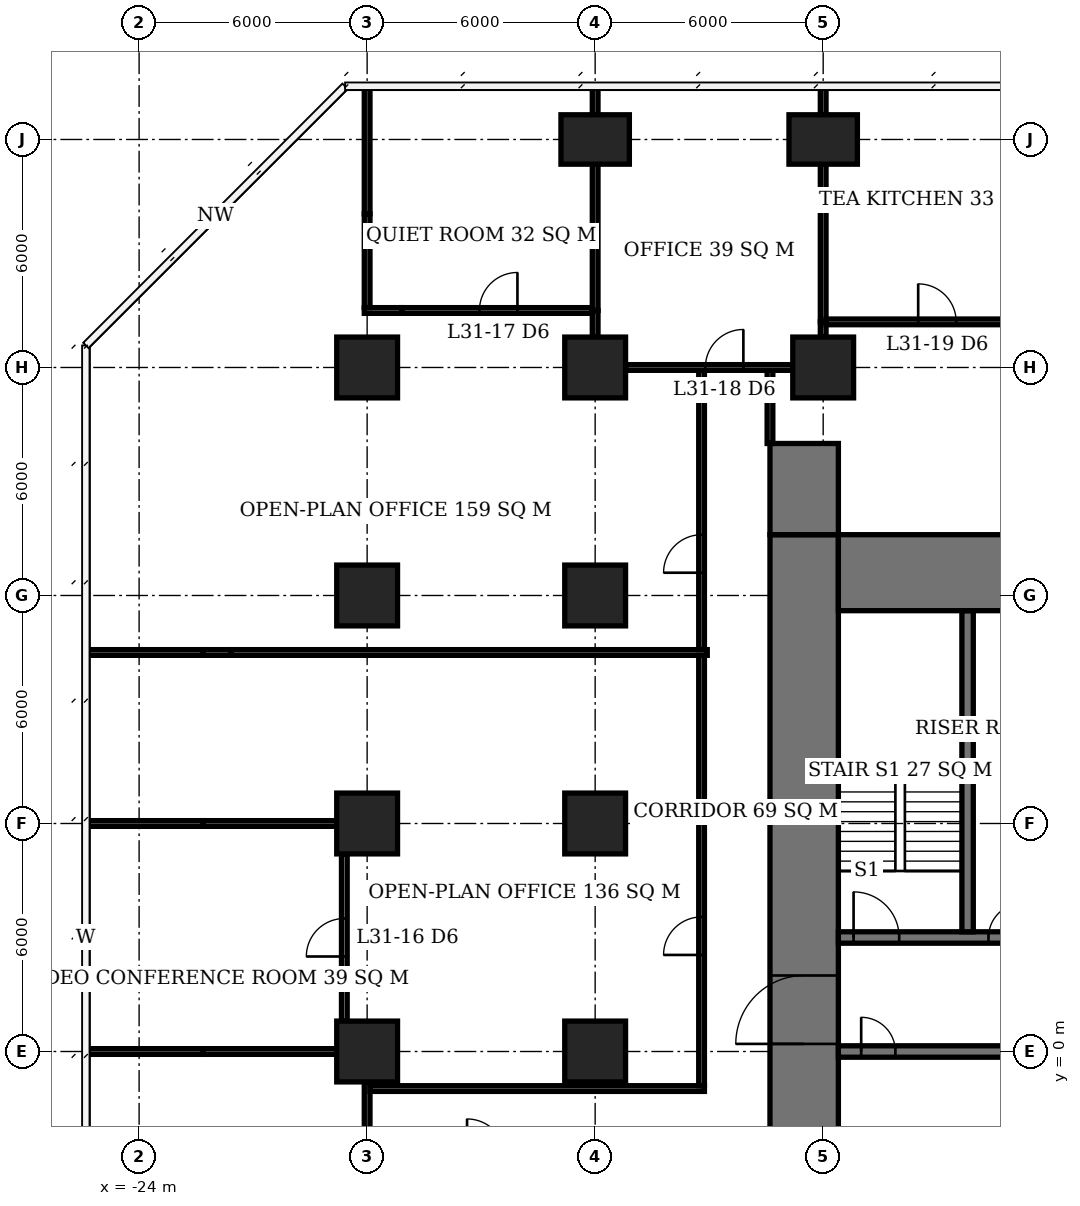
"""IFC4 building model, lengths in metres.
Left out: names, types, materials, properties, quantities, classifications, styles, units other than length and angle.
Written with IfcOpenShell. Run it as: python <this file> out.ifc"""

import sys

from ifc_helpers import new_model, si_unit, direction, frame, frame_2d, origin, origin_2d, place, context, subcontext, project, spatial, rectangle, extrude, element, fill, save


model = new_model("IFC4")
c1 = context("Model", 3, precision=1e-05, world=origin(), true_north=direction((0.0, 1.0)))
c2 = subcontext(c1, "Body", "Model", "MODEL_VIEW")
j1 = project(units=[si_unit("LENGTHUNIT", "METRE"), si_unit("PLANEANGLEUNIT", "RADIAN")], contexts=[c1])
p1 = place(None, origin())
s1 = spatial("IfcSite", under=j1, at=p1, CompositionType="ELEMENT")
p2 = place(p1, origin())
s2 = spatial("IfcBuilding", under=s1, at=p2, CompositionType="ELEMENT")
p3 = place(p2, frame((0.0, 0.0, 128.9)))
s3 = spatial("IfcBuildingStorey", under=s2, at=p3, CompositionType="ELEMENT", Elevation=128.9)
for number, where, z_axis, x_axis in (
    (1, (-18.0, 0.0, 0.0), (0.0, 0.0, 1.0), (1.0, 0.0, 0.0)),
    (2, (-18.0, 6.0, 0.0), (0.0, 0.0, 1.0), (1.0, 0.0, 0.0)),
    (3, (-18.0, 12.0, 0.0), (0.0, 0.0, 1.0), (1.0, 0.0, 0.0)),
    (4, (-18.0, 18.0, 0.0), (0.0, 0.0, 1.0), (1.0, 0.0, 0.0)),
    (5, (-12.0, 0.0, 0.0), (0.0, 0.0, 1.0), (1.0, 0.0, 0.0)),
    (6, (-12.0, 6.0, 0.0), (0.0, 0.0, 1.0), (1.0, 0.0, 0.0)),
    (7, (-12.0, 12.0, 0.0), (0.0, 0.0, 1.0), (1.0, 0.0, 0.0)),
    (8, (-12.0, 18.0, 0.0), (0.0, 0.0, 1.0), (1.0, 0.0, 0.0)),
):
    element("IfcColumn", number, at=place(p3, frame(where, z_axis=z_axis, x_axis=x_axis)), inside=s3, PredefinedType="COLUMN", context=c2, shape_type="SweptSolid", body=[
        extrude(rectangle(XDim=1.6, YDim=1.6, at=origin_2d()), origin(), (0.0, 0.0, 1.0), 3.9),
    ])
p4 = place(p3, frame((-12.0, 24.0, 0.0), z_axis=(0.0, 0.0, 1.0), x_axis=(1.0, 0.0, 0.0)))
e9 = element("IfcColumn", 9, at=p4, inside=s3, PredefinedType="COLUMN", context=c2, shape_type="SweptSolid", body=[
    extrude(rectangle(XDim=1.8, YDim=1.3, at=origin_2d()), origin(), (0.0, 0.0, 1.0), 3.9),
])
p5 = place(p3, frame((-6.0, 18.0, 0.0), z_axis=(0.0, 0.0, 1.0), x_axis=(1.0, 0.0, 0.0)))
e10 = element("IfcColumn", 10, at=p5, inside=s3, PredefinedType="COLUMN", context=c2, shape_type="SweptSolid", body=[
    extrude(rectangle(XDim=1.6, YDim=1.6, at=origin_2d()), origin(), (0.0, 0.0, 1.0), 3.9),
])
p6 = place(p3, frame((-6.0, 24.0, 0.0), z_axis=(0.0, 0.0, 1.0), x_axis=(1.0, 0.0, 0.0)))
e11 = element("IfcColumn", 11, at=p6, inside=s3, PredefinedType="COLUMN", context=c2, shape_type="SweptSolid", body=[
    extrude(rectangle(XDim=1.8, YDim=1.3, at=origin_2d()), origin(), (0.0, 0.0, 1.0), 3.9),
])
p7 = place(p3, frame((-5.6, 12.6, 0.0), z_axis=(0.0, 0.0, 1.0), x_axis=(1.0, 0.0, 0.0)))
e12 = element("IfcWall", 12, at=p7, inside=s3, PredefinedType="SHEAR", context=c2, shape_type="SweptSolid", body=[
    extrude(rectangle(XDim=23.2, YDim=2.0, at=frame_2d((11.6, 0.0))), origin(), (0.0, 0.0, 1.0), 3.9),
])
p8 = place(p3, frame((-6.5, -7.6, 0.0), z_axis=(0.0, 0.0, 1.0), x_axis=(0.0, 1.0, 0.0)))
e13 = element("IfcWall", 13, at=p8, inside=s3, PredefinedType="SHEAR", context=c2, shape_type="SweptSolid", body=[
    extrude(rectangle(XDim=21.2, YDim=1.8, at=frame_2d((10.6, 0.0))), origin(), (0.0, 0.0, 1.0), 3.9),
])
p9 = place(p8, frame((7.8, 0.0, 0.0)))
e14 = element("IfcOpeningElement", 14, at=p9, cuts=e13, PredefinedType="OPENING", context=c2, shape_type="SweptSolid", body=[
    extrude(rectangle(XDim=1.8, YDim=2.4, at=frame_2d((0.9, 1.2))), frame((0.0, 0.91, 0.0), z_axis=(0.0, -1.0, 0.0), x_axis=(1.0, 0.0, 0.0)), (0.0, 0.0, 1.0), 1.82),
])
p10 = place(p3, frame((-6.5, 13.6, 0.0), z_axis=(0.0, 0.0, 1.0), x_axis=(0.0, 1.0, 0.0)))
e15 = element("IfcWall", 15, at=p10, inside=s3, PredefinedType="SHEAR", context=c2, shape_type="SweptSolid", body=[
    extrude(rectangle(XDim=2.4, YDim=1.8, at=frame_2d((1.2, 0.0))), origin(), (0.0, 0.0, 1.0), 3.9),
])
p11 = place(p3, frame((-5.6, 0.0, 0.0), z_axis=(0.0, 0.0, 1.0), x_axis=(1.0, 0.0, 0.0)))
e16 = element("IfcWall", 16, at=p11, inside=s3, PredefinedType="SHEAR", context=c2, shape_type="SweptSolid", body=[
    extrude(rectangle(XDim=17.75, YDim=0.3, at=frame_2d((8.875, 0.0))), origin(), (0.0, 0.0, 1.0), 3.9),
])
p12 = place(p11, frame((0.6, 0.0, 0.0)))
e17 = element("IfcOpeningElement", 17, at=p12, cuts=e16, PredefinedType="OPENING", context=c2, shape_type="SweptSolid", body=[
    extrude(rectangle(XDim=0.9, YDim=2.1, at=frame_2d((0.45, 1.05))), frame((0.0, 0.16, 0.0), z_axis=(0.0, -1.0, 0.0), x_axis=(1.0, 0.0, 0.0)), (0.0, 0.0, 1.0), 0.32),
])
p13 = place(p11, frame((6.55, 0.0, 0.0)))
e18 = element("IfcOpeningElement", 18, at=p13, cuts=e16, PredefinedType="OPENING", context=c2, shape_type="SweptSolid", body=[
    extrude(rectangle(XDim=1.1, YDim=2.1, at=frame_2d((0.55, 1.05))), frame((0.0, 0.16, 0.0), z_axis=(0.0, -1.0, 0.0), x_axis=(1.0, 0.0, 0.0)), (0.0, 0.0, 1.0), 0.32),
])
p14 = place(p11, frame((9.55, 0.0, 0.0)))
e19 = element("IfcOpeningElement", 19, at=p14, cuts=e16, PredefinedType="OPENING", context=c2, shape_type="SweptSolid", body=[
    extrude(rectangle(XDim=1.1, YDim=2.1, at=frame_2d((0.55, 1.05))), frame((0.0, 0.16, 0.0), z_axis=(0.0, -1.0, 0.0), x_axis=(1.0, 0.0, 0.0)), (0.0, 0.0, 1.0), 0.32),
])
p15 = place(p3, frame((-5.6, 3.0, 0.0), z_axis=(0.0, 0.0, 1.0), x_axis=(1.0, 0.0, 0.0)))
e20 = element("IfcWall", 20, at=p15, inside=s3, PredefinedType="SHEAR", context=c2, shape_type="SweptSolid", body=[
    extrude(rectangle(XDim=5.45, YDim=0.3, at=frame_2d((2.725, 0.0))), origin(), (0.0, 0.0, 1.0), 3.9),
])
p16 = place(p15, frame((0.4, 0.0, 0.0)))
e21 = element("IfcOpeningElement", 21, at=p16, cuts=e20, PredefinedType="OPENING", context=c2, shape_type="SweptSolid", body=[
    extrude(rectangle(XDim=1.2, YDim=2.1, at=frame_2d((0.6, 1.05))), frame((0.0, 0.16, 0.0), z_axis=(0.0, -1.0, 0.0), x_axis=(1.0, 0.0, 0.0)), (0.0, 0.0, 1.0), 0.32),
])
p17 = place(p15, frame((3.95, 0.0, 0.0)))
e22 = element("IfcOpeningElement", 22, at=p17, cuts=e20, PredefinedType="OPENING", context=c2, shape_type="SweptSolid", body=[
    extrude(rectangle(XDim=0.9, YDim=2.1, at=frame_2d((0.45, 1.05))), frame((0.0, 0.16, 0.0), z_axis=(0.0, -1.0, 0.0), x_axis=(1.0, 0.0, 0.0)), (0.0, 0.0, 1.0), 0.32),
])
p18 = place(p3, frame((-2.2, 3.15, 0.0), z_axis=(0.0, 0.0, 1.0), x_axis=(0.0, 1.0, 0.0)))
e23 = element("IfcWall", 23, at=p18, inside=s3, PredefinedType="SHEAR", context=c2, shape_type="SweptSolid", body=[
    extrude(rectangle(XDim=8.45, YDim=0.3, at=frame_2d((4.225, 0.0))), origin(), (0.0, 0.0, 1.0), 3.9),
])
p19 = place(p3, frame((-25.35, 0.0, 0.0), z_axis=(0.0, 0.0, 1.0), x_axis=(1.0, 0.0, 0.0)))
e24 = element("IfcWall", 24, at=p19, inside=s3, PredefinedType="PARTITIONING", context=c2, shape_type="SweptSolid", body=[
    extrude(rectangle(XDim=3.04, YDim=0.15, at=frame_2d((1.52, 0.0))), origin(), (0.0, 0.0, 1.0), 3.65),
])
p20 = place(p3, frame((-22.31, 0.0, 0.0), z_axis=(0.0, 0.0, 1.0), x_axis=(1.0, 0.0, 0.0)))
e25 = element("IfcWall", 25, at=p20, inside=s3, PredefinedType="PARTITIONING", context=c2, shape_type="SweptSolid", body=[
    extrude(rectangle(XDim=3.51, YDim=0.15, at=frame_2d((1.755, 0.0))), origin(), (0.0, 0.0, 1.0), 2.65),
])
p21 = place(p3, frame((-25.35, 6.0, 0.0), z_axis=(0.0, 0.0, 1.0), x_axis=(1.0, 0.0, 0.0)))
e26 = element("IfcWall", 26, at=p21, inside=s3, PredefinedType="PARTITIONING", context=c2, shape_type="SweptSolid", body=[
    extrude(rectangle(XDim=3.04, YDim=0.15, at=frame_2d((1.52, 0.0))), origin(), (0.0, 0.0, 1.0), 3.65),
])
p22 = place(p3, frame((-22.31, 6.0, 0.0), z_axis=(0.0, 0.0, 1.0), x_axis=(1.0, 0.0, 0.0)))
e27 = element("IfcWall", 27, at=p22, inside=s3, PredefinedType="PARTITIONING", context=c2, shape_type="SweptSolid", body=[
    extrude(rectangle(XDim=3.51, YDim=0.15, at=frame_2d((1.755, 0.0))), origin(), (0.0, 0.0, 1.0), 2.65),
])
p23 = place(p3, frame((-11.2, 18.0, 0.0), z_axis=(0.0, 0.0, 1.0), x_axis=(1.0, 0.0, 0.0)))
e28 = element("IfcWall", 28, at=p23, inside=s3, PredefinedType="PARTITIONING", context=c2, shape_type="SweptSolid", body=[
    extrude(rectangle(XDim=4.4, YDim=0.15, at=frame_2d((2.2, 0.0))), origin(), (0.0, 0.0, 1.0), 3.65),
])
p24 = place(p23, frame((2.1, 0.0, 0.0)))
e29 = element("IfcOpeningElement", 29, at=p24, cuts=e28, PredefinedType="OPENING", context=c2, shape_type="SweptSolid", body=[
    extrude(rectangle(XDim=1.0, YDim=2.1, at=frame_2d((0.5, 1.05))), frame((0.0, 0.085, 0.0), z_axis=(0.0, -1.0, 0.0), x_axis=(1.0, 0.0, 0.0)), (0.0, 0.0, 1.0), 0.17),
])
p25 = place(p3, frame((-5.925, 19.2, 0.0), z_axis=(0.0, 0.0, 1.0), x_axis=(1.0, 0.0, 0.0)))
e30 = element("IfcWall", 30, at=p25, inside=s3, PredefinedType="PARTITIONING", context=c2, shape_type="SweptSolid", body=[
    extrude(rectangle(XDim=5.85, YDim=0.15, at=frame_2d((2.925, 0.0))), origin(), (0.0, 0.0, 1.0), 3.65),
])
p26 = place(p25, frame((2.425, 0.0, 0.0)))
e31 = element("IfcOpeningElement", 31, at=p26, cuts=e30, PredefinedType="OPENING", context=c2, shape_type="SweptSolid", body=[
    extrude(rectangle(XDim=1.0, YDim=2.1, at=frame_2d((0.5, 1.05))), frame((0.0, 0.085, 0.0), z_axis=(0.0, -1.0, 0.0), x_axis=(1.0, 0.0, 0.0)), (0.0, 0.0, 1.0), 0.17),
])
p27 = place(p3, frame((-18.075, 19.5, 0.0), z_axis=(0.0, 0.0, 1.0), x_axis=(1.0, 0.0, 0.0)))
e32 = element("IfcWall", 32, at=p27, inside=s3, PredefinedType="PARTITIONING", context=c2, shape_type="SweptSolid", body=[
    extrude(rectangle(XDim=0.985, YDim=0.15, at=frame_2d((0.492, 0.0))), origin(), (0.0, 0.0, 1.0), 2.65),
])
p28 = place(p3, frame((-17.09, 19.5, 0.0), z_axis=(0.0, 0.0, 1.0), x_axis=(1.0, 0.0, 0.0)))
e33 = element("IfcWall", 33, at=p28, inside=s3, PredefinedType="PARTITIONING", context=c2, shape_type="SweptSolid", body=[
    extrude(rectangle(XDim=5.015, YDim=0.15, at=frame_2d((2.508, 0.0))), origin(), (0.0, 0.0, 1.0), 3.65),
])
p29 = place(p28, frame((2.045, 0.0, 0.0)))
e34 = element("IfcOpeningElement", 34, at=p29, cuts=e33, PredefinedType="OPENING", context=c2, shape_type="SweptSolid", body=[
    extrude(rectangle(XDim=1.0, YDim=2.1, at=frame_2d((0.5, 1.05))), frame((0.0, 0.085, 0.0), z_axis=(0.0, -1.0, 0.0), x_axis=(1.0, 0.0, 0.0)), (0.0, 0.0, 1.0), 0.17),
])
p30 = place(p3, frame((-18.6, 0.8, 0.0), z_axis=(0.0, 0.0, 1.0), x_axis=(0.0, 1.0, 0.0)))
e35 = element("IfcWall", 35, at=p30, inside=s3, PredefinedType="PARTITIONING", context=c2, shape_type="SweptSolid", body=[
    extrude(rectangle(XDim=4.4, YDim=0.15, at=frame_2d((2.2, 0.0))), origin(), (0.0, 0.0, 1.0), 3.65),
])
p31 = place(p30, frame((1.7, 0.0, 0.0)))
e36 = element("IfcOpeningElement", 36, at=p31, cuts=e35, PredefinedType="OPENING", context=c2, shape_type="SweptSolid", body=[
    extrude(rectangle(XDim=1.0, YDim=2.1, at=frame_2d((0.5, 1.05))), frame((0.0, 0.085, 0.0), z_axis=(0.0, -1.0, 0.0), x_axis=(1.0, 0.0, 0.0)), (0.0, 0.0, 1.0), 0.17),
])
p32 = place(p3, frame((-18.0, -5.2, 0.0), z_axis=(0.0, 0.0, 1.0), x_axis=(0.0, 1.0, 0.0)))
e37 = element("IfcWall", 37, at=p32, inside=s3, PredefinedType="PARTITIONING", context=c2, shape_type="SweptSolid", body=[
    extrude(rectangle(XDim=4.4, YDim=0.15, at=frame_2d((2.2, 0.0))), origin(), (0.0, 0.0, 1.0), 3.65),
])
p33 = place(p3, frame((-18.0, 19.575, 0.0), z_axis=(0.0, 0.0, 1.0), x_axis=(0.0, 1.0, 0.0)))
e38 = element("IfcWall", 38, at=p33, inside=s3, PredefinedType="PARTITIONING", context=c2, shape_type="SweptSolid", body=[
    extrude(rectangle(XDim=2.47, YDim=0.15, at=frame_2d((1.235, 0.0))), origin(), (0.0, 0.0, 1.0), 2.65),
])
p34 = place(p3, frame((-18.0, 22.045, 0.0), z_axis=(0.0, 0.0, 1.0), x_axis=(0.0, 1.0, 0.0)))
e39 = element("IfcWall", 39, at=p34, inside=s3, PredefinedType="PARTITIONING", context=c2, shape_type="SweptSolid", body=[
    extrude(rectangle(XDim=3.355, YDim=0.15, at=frame_2d((1.677, 0.0))), origin(), (0.0, 0.0, 1.0), 3.65),
])
p35 = place(p3, frame((-12.0, 18.8, 0.0), z_axis=(0.0, 0.0, 1.0), x_axis=(0.0, 1.0, 0.0)))
e40 = element("IfcWall", 40, at=p35, inside=s3, PredefinedType="PARTITIONING", context=c2, shape_type="SweptSolid", body=[
    extrude(rectangle(XDim=0.7, YDim=0.15, at=frame_2d((0.35, 0.0))), origin(), (0.0, 0.0, 1.0), 3.65),
])
p36 = place(p3, frame((-12.0, 19.5, 0.0), z_axis=(0.0, 0.0, 1.0), x_axis=(0.0, 1.0, 0.0)))
e41 = element("IfcWall", 41, at=p36, inside=s3, PredefinedType="PARTITIONING", context=c2, shape_type="SweptSolid", body=[
    extrude(rectangle(XDim=3.85, YDim=0.15, at=frame_2d((1.925, 0.0))), origin(), (0.0, 0.0, 1.0), 3.65),
])
p37 = place(p3, frame((-12.0, 24.65, 0.0), z_axis=(0.0, 0.0, 1.0), x_axis=(0.0, 1.0, 0.0)))
e42 = element("IfcWall", 42, at=p37, inside=s3, PredefinedType="PARTITIONING", context=c2, shape_type="SweptSolid", body=[
    extrude(rectangle(XDim=0.75, YDim=0.15, at=frame_2d((0.375, 0.0))), origin(), (0.0, 0.0, 1.0), 3.65),
])
p38 = place(p3, frame((-6.0, 18.8, 0.0), z_axis=(0.0, 0.0, 1.0), x_axis=(0.0, 1.0, 0.0)))
e43 = element("IfcWall", 43, at=p38, inside=s3, PredefinedType="PARTITIONING", context=c2, shape_type="SweptSolid", body=[
    extrude(rectangle(XDim=0.4, YDim=0.15, at=frame_2d((0.2, 0.0))), origin(), (0.0, 0.0, 1.0), 3.65),
])
p39 = place(p3, frame((-6.0, 19.2, 0.0), z_axis=(0.0, 0.0, 1.0), x_axis=(0.0, 1.0, 0.0)))
e44 = element("IfcWall", 44, at=p39, inside=s3, PredefinedType="PARTITIONING", context=c2, shape_type="SweptSolid", body=[
    extrude(rectangle(XDim=4.15, YDim=0.15, at=frame_2d((2.075, 0.0))), origin(), (0.0, 0.0, 1.0), 3.65),
])
p40 = place(p3, frame((-6.0, 24.65, 0.0), z_axis=(0.0, 0.0, 1.0), x_axis=(0.0, 1.0, 0.0)))
e45 = element("IfcWall", 45, at=p40, inside=s3, PredefinedType="PARTITIONING", context=c2, shape_type="SweptSolid", body=[
    extrude(rectangle(XDim=0.75, YDim=0.15, at=frame_2d((0.375, 0.0))), origin(), (0.0, 0.0, 1.0), 3.65),
])
p41 = place(p3, frame((-25.4, 10.5, 0.0), z_axis=(0.0, 0.0, 1.0), x_axis=(1.0, 0.0, 0.0)))
e46 = element("IfcWall", 46, at=p41, inside=s3, PredefinedType="PARTITIONING", context=c2, shape_type="SweptSolid", body=[
    extrude(rectangle(XDim=3.09, YDim=0.15, at=frame_2d((1.545, 0.0))), origin(), (0.0, 0.0, 1.0), 3.65),
])
p42 = place(p3, frame((-22.31, 10.5, 0.0), z_axis=(0.0, 0.0, 1.0), x_axis=(1.0, 0.0, 0.0)))
e47 = element("IfcWall", 47, at=p42, inside=s3, PredefinedType="PARTITIONING", context=c2, shape_type="SweptSolid", body=[
    extrude(rectangle(XDim=0.72, YDim=0.15, at=frame_2d((0.36, 0.0))), origin(), (0.0, 0.0, 1.0), 2.65),
])
p43 = place(p3, frame((-21.59, 10.5, 0.0), z_axis=(0.0, 0.0, 1.0), x_axis=(1.0, 0.0, 0.0)))
e48 = element("IfcWall", 48, at=p43, inside=s3, PredefinedType="PARTITIONING", context=c2, shape_type="SweptSolid", body=[
    extrude(rectangle(XDim=12.54, YDim=0.15, at=frame_2d((6.27, 0.0))), origin(), (0.0, 0.0, 1.0), 3.65),
])
p44 = place(p3, frame((-17.925, -0.975, 0.0), z_axis=(0.0, 0.0, 1.0), x_axis=(1.0, 0.0, 0.0)))
e49 = element("IfcWall", 49, at=p44, inside=s3, PredefinedType="PARTITIONING", context=c2, shape_type="SweptSolid", body=[
    extrude(rectangle(XDim=8.8, YDim=0.15, at=frame_2d((4.4, 0.0))), origin(), (0.0, 0.0, 1.0), 3.65),
])
p45 = place(p3, frame((-9.2, -0.9, 0.0), z_axis=(0.0, 0.0, 1.0), x_axis=(0.0, 1.0, 0.0)))
e50 = element("IfcWall", 50, at=p45, inside=s3, PredefinedType="PARTITIONING", context=c2, shape_type="SweptSolid", body=[
    extrude(rectangle(XDim=11.325, YDim=0.15, at=frame_2d((5.663, 0.0))), origin(), (0.0, 0.0, 1.0), 3.65),
])
p46 = place(p45, frame((3.441, 0.0, 0.0)))
e51 = element("IfcOpeningElement", 51, at=p46, cuts=e50, PredefinedType="OPENING", context=c2, shape_type="SweptSolid", body=[
    extrude(rectangle(XDim=1.0, YDim=2.1, at=frame_2d((0.5, 1.05))), frame((0.0, 0.085, 0.0), z_axis=(0.0, -1.0, 0.0), x_axis=(1.0, 0.0, 0.0)), (0.0, 0.0, 1.0), 0.17),
])
p47 = place(p3, frame((-9.2, 10.575, 0.0), z_axis=(0.0, 0.0, 1.0), x_axis=(0.0, 1.0, 0.0)))
e52 = element("IfcWall", 52, at=p47, inside=s3, PredefinedType="PARTITIONING", context=c2, shape_type="SweptSolid", body=[
    extrude(rectangle(XDim=7.35, YDim=0.15, at=frame_2d((3.675, 0.0))), origin(), (0.0, 0.0, 1.0), 3.65),
])
p48 = place(p47, frame((2.024, 0.0, 0.0)))
e53 = element("IfcOpeningElement", 53, at=p48, cuts=e52, PredefinedType="OPENING", context=c2, shape_type="SweptSolid", body=[
    extrude(rectangle(XDim=1.0, YDim=2.1, at=frame_2d((0.5, 1.05))), frame((0.0, 0.085, 0.0), z_axis=(0.0, -1.0, 0.0), x_axis=(1.0, 0.0, 0.0)), (0.0, 0.0, 1.0), 0.17),
])
p49 = place(p3, frame((-7.4, 16.0, 0.0), z_axis=(0.0, 0.0, 1.0), x_axis=(0.0, 1.0, 0.0)))
e54 = element("IfcWall", 54, at=p49, inside=s3, PredefinedType="PARTITIONING", context=c2, shape_type="SweptSolid", body=[
    extrude(rectangle(XDim=1.925, YDim=0.15, at=frame_2d((0.962, 0.0))), origin(), (0.0, 0.0, 1.0), 3.65),
])
p50 = place(p9, origin())
e55 = element("IfcDoor", 55, at=p50, inside=s3, OperationType="DOUBLE_DOOR_SINGLE_SWING", PredefinedType="DOOR", context=c2, shape_type="SweptSolid", body=[
    extrude(rectangle(XDim=1.8, YDim=2.4, at=frame_2d((0.9, 1.2))), frame((0.0, 0.025, 0.0), z_axis=(0.0, -1.0, 0.0), x_axis=(1.0, 0.0, 0.0)), (0.0, 0.0, 1.0), 0.05),
])
fill(e14, e55)
p51 = place(p16, origin())
e56 = element("IfcDoor", 56, at=p51, inside=s3, OperationType="SINGLE_SWING_LEFT", PredefinedType="DOOR", context=c2, shape_type="SweptSolid", body=[
    extrude(rectangle(XDim=1.2, YDim=2.1, at=frame_2d((0.6, 1.05))), frame((0.0, 0.025, 0.0), z_axis=(0.0, -1.0, 0.0), x_axis=(1.0, 0.0, 0.0)), (0.0, 0.0, 1.0), 0.05),
])
fill(e21, e56)
p52 = place(p17, origin())
e57 = element("IfcDoor", 57, at=p52, inside=s3, OperationType="SINGLE_SWING_RIGHT", PredefinedType="DOOR", context=c2, shape_type="SweptSolid", body=[
    extrude(rectangle(XDim=0.9, YDim=2.1, at=frame_2d((0.45, 1.05))), frame((0.0, 0.025, 0.0), z_axis=(0.0, -1.0, 0.0), x_axis=(1.0, 0.0, 0.0)), (0.0, 0.0, 1.0), 0.05),
])
fill(e22, e57)
p53 = place(p12, origin())
e58 = element("IfcDoor", 58, at=p53, inside=s3, OperationType="SINGLE_SWING_LEFT", PredefinedType="DOOR", context=c2, shape_type="SweptSolid", body=[
    extrude(rectangle(XDim=0.9, YDim=2.1, at=frame_2d((0.45, 1.05))), frame((0.0, 0.025, 0.0), z_axis=(0.0, -1.0, 0.0), x_axis=(1.0, 0.0, 0.0)), (0.0, 0.0, 1.0), 0.05),
])
fill(e17, e58)
p54 = place(p31, origin())
e59 = element("IfcDoor", 59, at=p54, inside=s3, OperationType="SINGLE_SWING_LEFT", PredefinedType="DOOR", context=c2, shape_type="SweptSolid", body=[
    extrude(rectangle(XDim=1.0, YDim=2.1, at=frame_2d((0.5, 1.05))), frame((0.0, 0.025, 0.0), z_axis=(0.0, -1.0, 0.0), x_axis=(1.0, 0.0, 0.0)), (0.0, 0.0, 1.0), 0.05),
])
fill(e36, e59)
p55 = place(p29, origin())
e60 = element("IfcDoor", 60, at=p55, inside=s3, OperationType="SINGLE_SWING_RIGHT", PredefinedType="DOOR", context=c2, shape_type="SweptSolid", body=[
    extrude(rectangle(XDim=1.0, YDim=2.1, at=frame_2d((0.5, 1.05))), frame((0.0, 0.025, 0.0), z_axis=(0.0, -1.0, 0.0), x_axis=(1.0, 0.0, 0.0)), (0.0, 0.0, 1.0), 0.05),
])
fill(e34, e60)
p56 = place(p24, origin())
e61 = element("IfcDoor", 61, at=p56, inside=s3, OperationType="SINGLE_SWING_RIGHT", PredefinedType="DOOR", context=c2, shape_type="SweptSolid", body=[
    extrude(rectangle(XDim=1.0, YDim=2.1, at=frame_2d((0.5, 1.05))), frame((0.0, 0.025, 0.0), z_axis=(0.0, -1.0, 0.0), x_axis=(1.0, 0.0, 0.0)), (0.0, 0.0, 1.0), 0.05),
])
fill(e29, e61)
p57 = place(p26, origin())
e62 = element("IfcDoor", 62, at=p57, inside=s3, OperationType="SINGLE_SWING_LEFT", PredefinedType="DOOR", context=c2, shape_type="SweptSolid", body=[
    extrude(rectangle(XDim=1.0, YDim=2.1, at=frame_2d((0.5, 1.05))), frame((0.0, 0.025, 0.0), z_axis=(0.0, -1.0, 0.0), x_axis=(1.0, 0.0, 0.0)), (0.0, 0.0, 1.0), 0.05),
])
fill(e31, e62)
p58 = place(p46, origin())
e63 = element("IfcDoor", 63, at=p58, inside=s3, OperationType="SINGLE_SWING_LEFT", PredefinedType="DOOR", context=c2, shape_type="SweptSolid", body=[
    extrude(rectangle(XDim=1.0, YDim=2.1, at=frame_2d((0.5, 1.05))), frame((0.0, 0.025, 0.0), z_axis=(0.0, -1.0, 0.0), x_axis=(1.0, 0.0, 0.0)), (0.0, 0.0, 1.0), 0.05),
])
fill(e51, e63)
p59 = place(p48, origin())
e64 = element("IfcDoor", 64, at=p59, inside=s3, OperationType="SINGLE_SWING_LEFT", PredefinedType="DOOR", context=c2, shape_type="SweptSolid", body=[
    extrude(rectangle(XDim=1.0, YDim=2.1, at=frame_2d((0.5, 1.05))), frame((0.0, 0.025, 0.0), z_axis=(0.0, -1.0, 0.0), x_axis=(1.0, 0.0, 0.0)), (0.0, 0.0, 1.0), 0.05),
])
fill(e53, e64)
save(model, sys.argv[1])
